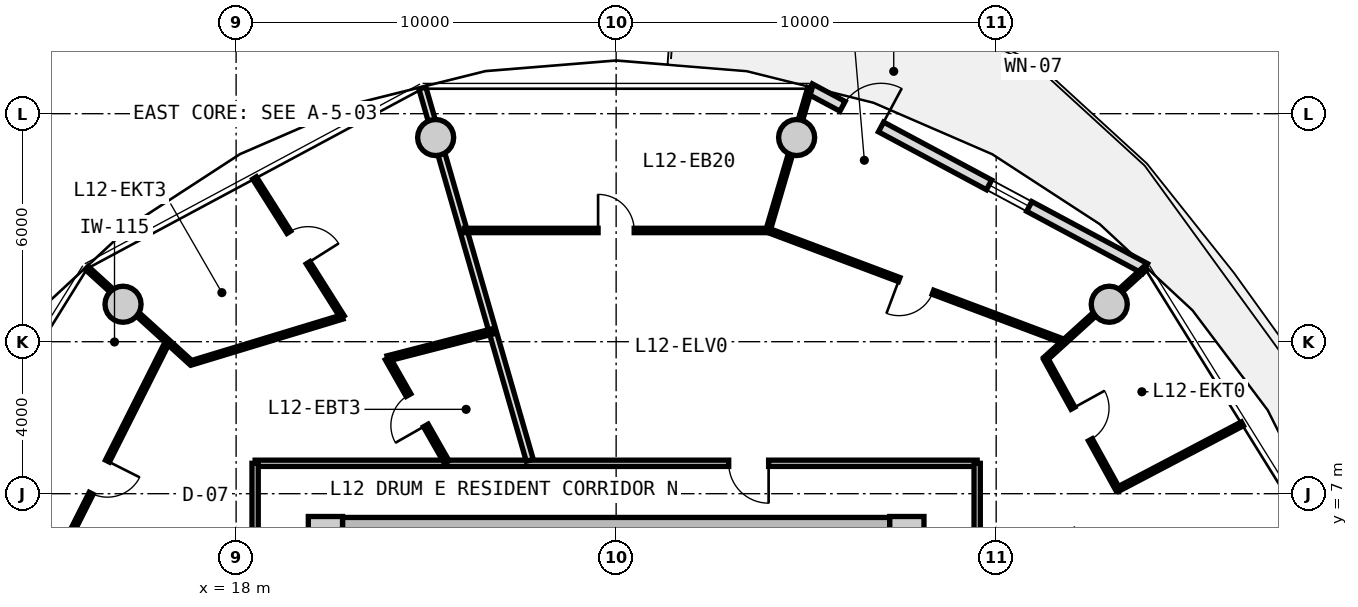
"""IFC4 building model, lengths in metres.
Left out: names, types, materials, properties, quantities, classifications, styles, units other than length and angle.
Written with IfcOpenShell. Run it as: python <this file> out.ifc"""

import sys

from ifc_helpers import new_model, si_unit, direction, frame, frame_2d, origin, origin_2d, place, context, subcontext, project, spatial, rectangle, circle, extrude, source, transform, mapped, element, fill, save


model = new_model("IFC4")
c1 = context("Model", 3, precision=1e-05, world=origin(), true_north=direction((0.0, 1.0)))
c2 = subcontext(c1, "Body", "Model", "MODEL_VIEW")
j1 = project(units=[si_unit("LENGTHUNIT", "METRE"), si_unit("PLANEANGLEUNIT", "RADIAN")], contexts=[c1])
p1 = place(None, origin())
s1 = spatial("IfcSite", under=j1, at=p1, CompositionType="ELEMENT")
p2 = place(p1, origin())
s2 = spatial("IfcBuilding", under=s1, at=p2, CompositionType="ELEMENT")
p3 = place(p2, frame((0.0, 0.0, 42.95)))
s3 = spatial("IfcBuildingStorey", under=s2, at=p3, CompositionType="ELEMENT", Elevation=42.95)
m1 = source(origin(), c2, "Body", "SweptSolid", [
    extrude(rectangle(XDim=0.9, YDim=0.9, at=origin_2d()), origin(), (0.0, 0.0, 1.0), 3.05),
])
for number, where, z_axis, x_axis in (
    (1, (35.65, 5.95, 0.0), (0.0, 0.0, 1.0), (1.0, 0.0, 0.0)),
    (2, (20.35, 5.95, 0.0), (0.0, 0.0, 1.0), (1.0, 0.0, 0.0)),
):
    element("IfcColumn", number, at=place(p3, frame(where, z_axis=z_axis, x_axis=x_axis)), inside=s3, PredefinedType="COLUMN", context=c2, shape_type="MappedRepresentation", body=[
        mapped(m1, transform((0.0, 0.0, 0.0), x_axis=(1.0, 0.0, 0.0), y_axis=(0.0, 1.0, 0.0), z_axis=(0.0, 0.0, 1.0), scale=1.0)),
    ])
m2 = source(origin(), c2, "Body", "SweptSolid", [
    extrude(rectangle(XDim=14.4, YDim=0.85, at=frame_2d((7.2, 0.0))), origin(), (0.0, 0.0, 1.0), 2.79),
])
p4 = place(p3, frame((20.8, 5.95, 0.0), z_axis=(0.0, 0.0, 1.0), x_axis=(1.0, 0.0, 0.0)))
e3 = element("IfcWall", 3, at=p4, inside=s3, PredefinedType="SHEAR", context=c2, shape_type="MappedRepresentation", body=[
    mapped(m2, transform((0.0, 0.0, 0.0), x_axis=(1.0, 0.0, 0.0), y_axis=(0.0, 1.0, 0.0), z_axis=(0.0, 0.0, 1.0), scale=1.0)),
])
m3 = source(origin(), c2, "Body", "SweptSolid", [
    extrude(circle(Radius=0.475, at=origin_2d()), origin(), (0.0, 0.0, 1.0), 3.05),
])
for number, where, z_axis, x_axis in (
    (4, (40.975, 11.985, 0.0), (0.0, 0.0, 1.0), (1.0, 0.0, 0.0)),
    (5, (32.749, 16.373, 0.0), (0.0, 0.0, 1.0), (1.0, 0.0, 0.0)),
    (6, (23.251, 16.373, 0.0), (0.0, 0.0, 1.0), (1.0, 0.0, 0.0)),
    (7, (15.025, 11.985, 0.0), (0.0, 0.0, 1.0), (1.0, 0.0, 0.0)),
):
    element("IfcColumn", number, at=place(p3, frame(where, z_axis=z_axis, x_axis=x_axis)), inside=s3, PredefinedType="COLUMN", context=c2, shape_type="MappedRepresentation", body=[
        mapped(m3, transform((0.0, 0.0, 0.0), x_axis=(1.0, 0.0, 0.0), y_axis=(0.0, 1.0, 0.0), z_axis=(0.0, 0.0, 1.0), scale=1.0)),
    ])
m4 = source(origin(), c2, "Body", "SweptSolid", [
    extrude(rectangle(XDim=10.011, YDim=0.29, at=frame_2d((5.005, 0.0))), origin(), (0.0, 0.0, 1.0), 2.79),
])
p5 = place(p3, frame((33.094, 17.657, 0.0), z_axis=(0.0, 0.0, 1.0), x_axis=(0.881272505317, -0.472608475773, 0.0)))
e8 = element("IfcWall", 8, at=p5, inside=s3, PredefinedType="SOLIDWALL", context=c2, shape_type="MappedRepresentation", body=[
    mapped(m4, transform((0.0, 0.0, 0.0), x_axis=(1.0, 0.0, 0.0), y_axis=(0.0, 1.0, 0.0), z_axis=(0.0, 0.0, 1.0), scale=1.0)),
])
p6 = place(p5, frame((0.98, 0.0, 0.0)))
e9 = element("IfcOpeningElement", 9, at=p6, cuts=e8, PredefinedType="OPENING", context=c2, shape_type="SweptSolid", body=[
    extrude(rectangle(XDim=1.15, YDim=2.25, at=frame_2d((0.575, 1.125))), frame((0.0, 0.155, 0.0), z_axis=(0.0, -1.0, 0.0), x_axis=(1.0, 0.0, 0.0)), (0.0, 0.0, 1.0), 0.31),
])
p7 = place(p5, frame((5.355, 0.0, 0.85)))
e10 = element("IfcOpeningElement", 10, at=p7, cuts=e8, PredefinedType="OPENING", context=c2, shape_type="SweptSolid", body=[
    extrude(rectangle(XDim=1.2, YDim=1.5, at=frame_2d((0.6, 0.75))), frame((0.0, 0.155, 0.0), z_axis=(0.0, -1.0, 0.0), x_axis=(1.0, 0.0, 0.0)), (0.0, 0.0, 1.0), 0.31),
])
m5 = source(origin(), c2, "Body", "SweptSolid", [
    extrude(rectangle(XDim=19.0, YDim=0.165, at=frame_2d((9.5, 0.0))), origin(), (0.0, 0.0, 1.0), 2.775),
])
p8 = place(p3, frame((18.5, 7.8, 0.0), z_axis=(0.0, 0.0, 1.0), x_axis=(1.0, 0.0, 0.0)))
e11 = element("IfcWall", 11, at=p8, inside=s3, PredefinedType="PARTITIONING", context=c2, shape_type="MappedRepresentation", body=[
    mapped(m5, transform((0.0, 0.0, 0.0), x_axis=(1.0, 0.0, 0.0), y_axis=(0.0, 1.0, 0.0), z_axis=(0.0, 0.0, 1.0), scale=1.0)),
])
p9 = place(p8, frame((12.462, 0.0, 0.0)))
e12 = element("IfcOpeningElement", 12, at=p9, cuts=e11, PredefinedType="OPENING", context=c2, shape_type="SweptSolid", body=[
    extrude(rectangle(XDim=1.05, YDim=2.15, at=frame_2d((0.525, 1.075))), frame((0.0, 0.093, 0.0), z_axis=(0.0, -1.0, 0.0), x_axis=(1.0, 0.0, 0.0)), (0.0, 0.0, 1.0), 0.185),
])
m6 = source(origin(), c2, "Body", "SweptSolid", [
    extrude(rectangle(XDim=15.6, YDim=0.165, at=frame_2d((7.8, 0.0))), origin(), (0.0, 0.0, 1.0), 2.775),
])
p10 = place(p3, frame((18.5, -7.8, 0.0), z_axis=(0.0, 0.0, 1.0), x_axis=(0.0, 1.0, 0.0)))
e13 = element("IfcWall", 13, at=p10, inside=s3, PredefinedType="PARTITIONING", context=c2, shape_type="MappedRepresentation", body=[
    mapped(m6, transform((0.0, 0.0, 0.0), x_axis=(1.0, 0.0, 0.0), y_axis=(0.0, 1.0, 0.0), z_axis=(0.0, 0.0, 1.0), scale=1.0)),
])
p11 = place(p10, frame((7.275, 0.0, 0.0)))
e14 = element("IfcOpeningElement", 14, at=p11, cuts=e13, PredefinedType="OPENING", context=c2, shape_type="SweptSolid", body=[
    extrude(rectangle(XDim=1.05, YDim=2.15, at=frame_2d((0.525, 1.075))), frame((0.0, 0.093, 0.0), z_axis=(0.0, -1.0, 0.0), x_axis=(1.0, 0.0, 0.0)), (0.0, 0.0, 1.0), 0.185),
])
p12 = place(p3, frame((37.5, 7.8, 0.0), z_axis=(0.0, 0.0, 1.0), x_axis=(0.0, -1.0, 0.0)))
e15 = element("IfcWall", 15, at=p12, inside=s3, PredefinedType="PARTITIONING", context=c2, shape_type="MappedRepresentation", body=[
    mapped(m6, transform((0.0, 0.0, 0.0), x_axis=(1.0, 0.0, 0.0), y_axis=(0.0, 1.0, 0.0), z_axis=(0.0, 0.0, 1.0), scale=1.0)),
])
p13 = place(p12, frame((14.215, 0.0, 0.0)))
e16 = element("IfcOpeningElement", 16, at=p13, cuts=e15, PredefinedType="OPENING", context=c2, shape_type="SweptSolid", body=[
    extrude(rectangle(XDim=0.92, YDim=2.1, at=frame_2d((0.46, 1.05))), frame((0.0, 0.093, 0.0), z_axis=(0.0, -1.0, 0.0), x_axis=(1.0, 0.0, 0.0)), (0.0, 0.0, 1.0), 0.185),
])
p14 = place(p12, frame((11.609, 0.0, 0.0)))
e17 = element("IfcOpeningElement", 17, at=p14, cuts=e15, PredefinedType="OPENING", context=c2, shape_type="SweptSolid", body=[
    extrude(rectangle(XDim=0.92, YDim=2.1, at=frame_2d((0.46, 1.05))), frame((0.0, 0.093, 0.0), z_axis=(0.0, -1.0, 0.0), x_axis=(1.0, 0.0, 0.0)), (0.0, 0.0, 1.0), 0.185),
])
p15 = place(p12, frame((7.175, 0.0, 0.0)))
e18 = element("IfcOpeningElement", 18, at=p15, cuts=e15, PredefinedType="OPENING", context=c2, shape_type="SweptSolid", body=[
    extrude(rectangle(XDim=1.25, YDim=2.2, at=frame_2d((0.625, 1.1))), frame((0.0, 0.093, 0.0), z_axis=(0.0, -1.0, 0.0), x_axis=(1.0, 0.0, 0.0)), (0.0, 0.0, 1.0), 0.185),
])
m7 = source(origin(), c2, "Body", "SweptSolid", [
    extrude(rectangle(XDim=10.196, YDim=0.19, at=frame_2d((5.098, 0.0))), origin(), (0.0, 0.0, 1.0), 2.225),
])
p16 = place(p3, frame((25.727, 7.88, 0.0), z_axis=(0.0, 0.0, 1.0), x_axis=(-0.277136420347, 0.960830580549, 0.0)))
e19 = element("IfcWall", 19, at=p16, inside=s3, PredefinedType="PARTITIONING", context=c2, shape_type="MappedRepresentation", body=[
    mapped(m7, transform((0.0, 0.0, 0.0), x_axis=(1.0, 0.0, 0.0), y_axis=(0.0, 1.0, 0.0), z_axis=(0.0, 0.0, 1.0), scale=1.0)),
])
m8 = source(origin(), c2, "Body", "SweptSolid", [
    extrude(rectangle(XDim=8.018, YDim=0.115, at=frame_2d((4.009, 0.0))), origin(), (0.0, 0.0, 1.0), 2.775),
])
p17 = place(p3, frame((16.205, 11.014, 0.0), z_axis=(0.0, 0.0, 1.0), x_axis=(-0.450134355233, -0.89296084026, 0.0)))
e20 = element("IfcWall", 20, at=p17, inside=s3, PredefinedType="PARTITIONING", context=c2, shape_type="MappedRepresentation", body=[
    mapped(m8, transform((0.0, 0.0, 0.0), x_axis=(1.0, 0.0, 0.0), y_axis=(0.0, 1.0, 0.0), z_axis=(0.0, 0.0, 1.0), scale=1.0)),
])
p18 = place(p17, frame((3.534, 0.0, 0.0)))
e21 = element("IfcOpeningElement", 21, at=p18, cuts=e20, PredefinedType="OPENING", context=c2, shape_type="SweptSolid", body=[
    extrude(rectangle(XDim=0.95, YDim=2.1, at=frame_2d((0.475, 1.05))), frame((0.0, 0.067, 0.0), z_axis=(0.0, -1.0, 0.0), x_axis=(1.0, 0.0, 0.0)), (0.0, 0.0, 1.0), 0.135),
])
m9 = source(origin(), c2, "Body", "SweptSolid", [
    extrude(rectangle(XDim=3.7, YDim=0.115, at=frame_2d((1.85, 0.0))), origin(), (0.0, 0.0, 1.0), 2.225),
])
p19 = place(p3, frame((16.808, 10.451, 0.0), z_axis=(0.0, 0.0, 1.0), x_axis=(-0.739922161065, 0.672692497033, 0.0)))
e22 = element("IfcWall", 22, at=p19, inside=s3, PredefinedType="PARTITIONING", context=c2, shape_type="MappedRepresentation", body=[
    mapped(m9, transform((0.0, 0.0, 0.0), x_axis=(1.0, 0.0, 0.0), y_axis=(0.0, 1.0, 0.0), z_axis=(0.0, 0.0, 1.0), scale=1.0)),
])
m10 = source(origin(), c2, "Body", "SweptSolid", [
    extrude(rectangle(XDim=3.141, YDim=0.14, at=frame_2d((1.571, 0.0))), origin(), (0.0, 0.0, 1.0), 2.775),
])
p20 = place(p3, frame((23.542, 7.83, 0.0), z_axis=(0.0, 0.0, 1.0), x_axis=(-0.494874486088, 0.868964465913, 0.0)))
e23 = element("IfcWall", 23, at=p20, inside=s3, PredefinedType="PARTITIONING", context=c2, shape_type="MappedRepresentation", body=[
    mapped(m10, transform((0.0, 0.0, 0.0), x_axis=(1.0, 0.0, 0.0), y_axis=(0.0, 1.0, 0.0), z_axis=(0.0, 0.0, 1.0), scale=1.0)),
])
p21 = place(p20, frame((1.111, 0.0, 0.0)))
e24 = element("IfcOpeningElement", 24, at=p21, cuts=e23, PredefinedType="OPENING", context=c2, shape_type="SweptSolid", body=[
    extrude(rectangle(XDim=0.92, YDim=2.1, at=frame_2d((0.46, 1.05))), frame((0.0, 0.08, 0.0), z_axis=(0.0, -1.0, 0.0), x_axis=(1.0, 0.0, 0.0)), (0.0, 0.0, 1.0), 0.16),
])
m11 = source(origin(), c2, "Body", "SweptSolid", [
    extrude(rectangle(XDim=2.868, YDim=0.14, at=frame_2d((1.434, 0.0))), origin(), (0.0, 0.0, 1.0), 2.775),
])
p22 = place(p3, frame((21.987, 10.56, 0.0), z_axis=(0.0, 0.0, 1.0), x_axis=(0.968467705195, 0.249139125778, 0.0)))
e25 = element("IfcWall", 25, at=p22, inside=s3, PredefinedType="PARTITIONING", context=c2, shape_type="MappedRepresentation", body=[
    mapped(m11, transform((0.0, 0.0, 0.0), x_axis=(1.0, 0.0, 0.0), y_axis=(0.0, 1.0, 0.0), z_axis=(0.0, 0.0, 1.0), scale=1.0)),
])
m12 = source(origin(), c2, "Body", "SweptSolid", [
    extrude(rectangle(XDim=4.326, YDim=0.115, at=frame_2d((2.163, 0.0))), origin(), (0.0, 0.0, 1.0), 2.775),
])
p23 = place(p3, frame((20.796, 11.651, 0.0), z_axis=(0.0, 0.0, 1.0), x_axis=(-0.534101263803, 0.845420510755, 0.0)))
e26 = element("IfcWall", 26, at=p23, inside=s3, PredefinedType="PARTITIONING", context=c2, shape_type="MappedRepresentation", body=[
    mapped(m12, transform((0.0, 0.0, 0.0), x_axis=(1.0, 0.0, 0.0), y_axis=(0.0, 1.0, 0.0), z_axis=(0.0, 0.0, 1.0), scale=1.0)),
])
p24 = place(p23, frame((1.688, 0.0, 0.0)))
e27 = element("IfcOpeningElement", 27, at=p24, cuts=e26, PredefinedType="OPENING", context=c2, shape_type="SweptSolid", body=[
    extrude(rectangle(XDim=0.95, YDim=2.1, at=frame_2d((0.475, 1.05))), frame((0.0, 0.067, 0.0), z_axis=(0.0, -1.0, 0.0), x_axis=(1.0, 0.0, 0.0)), (0.0, 0.0, 1.0), 0.135),
])
m13 = source(origin(), c2, "Body", "SweptSolid", [
    extrude(rectangle(XDim=4.159, YDim=0.115, at=frame_2d((2.079, 0.0))), origin(), (0.0, 0.0, 1.0), 2.415),
])
p25 = place(p3, frame((20.796, 11.651, 0.0), z_axis=(0.0, 0.0, 1.0), x_axis=(-0.956846477815, -0.290593905466, 0.0)))
e28 = element("IfcWall", 28, at=p25, inside=s3, PredefinedType="PARTITIONING", context=c2, shape_type="MappedRepresentation", body=[
    mapped(m13, transform((0.0, 0.0, 0.0), x_axis=(1.0, 0.0, 0.0), y_axis=(0.0, 1.0, 0.0), z_axis=(0.0, 0.0, 1.0), scale=1.0)),
])
m14 = source(origin(), c2, "Body", "SweptSolid", [
    extrude(rectangle(XDim=8.32, YDim=0.115, at=frame_2d((4.16, 0.0))), origin(), (0.0, 0.0, 1.0), 2.775),
])
p26 = place(p3, frame((39.786, 11.006, 0.0), z_axis=(0.0, 0.0, 1.0), x_axis=(-0.936180763098, 0.351518959382, 0.0)))
e29 = element("IfcWall", 29, at=p26, inside=s3, PredefinedType="PARTITIONING", context=c2, shape_type="MappedRepresentation", body=[
    mapped(m14, transform((0.0, 0.0, 0.0), x_axis=(1.0, 0.0, 0.0), y_axis=(0.0, 1.0, 0.0), z_axis=(0.0, 0.0, 1.0), scale=1.0)),
])
p27 = place(p26, frame((3.685, 0.0, 0.0)))
e30 = element("IfcOpeningElement", 30, at=p27, cuts=e29, PredefinedType="OPENING", context=c2, shape_type="SweptSolid", body=[
    extrude(rectangle(XDim=0.95, YDim=2.1, at=frame_2d((0.475, 1.05))), frame((0.0, 0.067, 0.0), z_axis=(0.0, -1.0, 0.0), x_axis=(1.0, 0.0, 0.0)), (0.0, 0.0, 1.0), 0.135),
])
m15 = source(origin(), c2, "Body", "SweptSolid", [
    extrude(rectangle(XDim=3.563, YDim=0.115, at=frame_2d((1.781, 0.0))), origin(), (0.0, 0.0, 1.0), 2.225),
])
p28 = place(p3, frame((39.292, 10.545, 0.0), z_axis=(0.0, 0.0, 1.0), x_axis=(0.740277955068, 0.672300936515, 0.0)))
e31 = element("IfcWall", 31, at=p28, inside=s3, PredefinedType="PARTITIONING", context=c2, shape_type="MappedRepresentation", body=[
    mapped(m15, transform((0.0, 0.0, 0.0), x_axis=(1.0, 0.0, 0.0), y_axis=(0.0, 1.0, 0.0), z_axis=(0.0, 0.0, 1.0), scale=1.0)),
])
m16 = source(origin(), c2, "Body", "SweptSolid", [
    extrude(rectangle(XDim=7.993, YDim=0.115, at=frame_2d((3.996, 0.0))), origin(), (0.0, 0.0, 1.0), 2.775),
])
p29 = place(p3, frame((31.996, 13.927, 0.0), z_axis=(0.0, 0.0, 1.0), x_axis=(-1.0, 0.0, 0.0)))
e32 = element("IfcWall", 32, at=p29, inside=s3, PredefinedType="PARTITIONING", context=c2, shape_type="MappedRepresentation", body=[
    mapped(m16, transform((0.0, 0.0, 0.0), x_axis=(1.0, 0.0, 0.0), y_axis=(0.0, 1.0, 0.0), z_axis=(0.0, 0.0, 1.0), scale=1.0)),
])
p30 = place(p29, frame((3.521, 0.0, 0.0)))
e33 = element("IfcOpeningElement", 33, at=p30, cuts=e32, PredefinedType="OPENING", context=c2, shape_type="SweptSolid", body=[
    extrude(rectangle(XDim=0.95, YDim=2.1, at=frame_2d((0.475, 1.05))), frame((0.0, 0.067, 0.0), z_axis=(0.0, -1.0, 0.0), x_axis=(1.0, 0.0, 0.0)), (0.0, 0.0, 1.0), 0.135),
])
m17 = source(origin(), c2, "Body", "SweptSolid", [
    extrude(rectangle(XDim=3.908, YDim=0.115, at=frame_2d((1.954, 0.0))), origin(), (0.0, 0.0, 1.0), 2.225),
])
p31 = place(p3, frame((31.996, 13.927, 0.0), z_axis=(0.0, 0.0, 1.0), x_axis=(0.282047948883, 0.959400309845, 0.0)))
e34 = element("IfcWall", 34, at=p31, inside=s3, PredefinedType="PARTITIONING", context=c2, shape_type="MappedRepresentation", body=[
    mapped(m17, transform((0.0, 0.0, 0.0), x_axis=(1.0, 0.0, 0.0), y_axis=(0.0, 1.0, 0.0), z_axis=(0.0, 0.0, 1.0), scale=1.0)),
])
m18 = source(origin(), c2, "Body", "SweptSolid", [
    extrude(rectangle(XDim=3.706, YDim=0.115, at=frame_2d((1.853, 0.0))), origin(), (0.0, 0.0, 1.0), 2.775),
])
p32 = place(p3, frame((41.198, 7.115, 0.0), z_axis=(0.0, 0.0, 1.0), x_axis=(0.88538502503, 0.464858427322, 0.0)))
e35 = element("IfcWall", 35, at=p32, inside=s3, PredefinedType="PARTITIONING", context=c2, shape_type="MappedRepresentation", body=[
    mapped(m18, transform((0.0, 0.0, 0.0), x_axis=(1.0, 0.0, 0.0), y_axis=(0.0, 1.0, 0.0), z_axis=(0.0, 0.0, 1.0), scale=1.0)),
])
m19 = source(origin(), c2, "Body", "SweptSolid", [
    extrude(rectangle(XDim=3.926, YDim=0.115, at=frame_2d((1.963, 0.0))), origin(), (0.0, 0.0, 1.0), 2.775),
])
p33 = place(p3, frame((41.198, 7.115, 0.0), z_axis=(0.0, 0.0, 1.0), x_axis=(-0.483037889915, 0.875599450038, 0.0)))
e36 = element("IfcWall", 36, at=p33, inside=s3, PredefinedType="PARTITIONING", context=c2, shape_type="MappedRepresentation", body=[
    mapped(m19, transform((0.0, 0.0, 0.0), x_axis=(1.0, 0.0, 0.0), y_axis=(0.0, 1.0, 0.0), z_axis=(0.0, 0.0, 1.0), scale=1.0)),
])
p34 = place(p33, frame((1.488, 0.0, 0.0)))
e37 = element("IfcOpeningElement", 37, at=p34, cuts=e36, PredefinedType="OPENING", context=c2, shape_type="SweptSolid", body=[
    extrude(rectangle(XDim=0.95, YDim=2.1, at=frame_2d((0.475, 1.05))), frame((0.0, 0.067, 0.0), z_axis=(0.0, -1.0, 0.0), x_axis=(1.0, 0.0, 0.0)), (0.0, 0.0, 1.0), 0.135),
])
m20 = source(origin(), c2, "Body", "SweptSolid", [
    extrude(rectangle(XDim=1.15, YDim=2.25, at=frame_2d((0.575, 1.125))), frame((0.0, 0.025, 0.0), z_axis=(0.0, -1.0, 0.0), x_axis=(1.0, 0.0, 0.0)), (0.0, 0.0, 1.0), 0.05),
])
p35 = place(p6, origin())
e38 = element("IfcDoor", 38, at=p35, inside=s3, OperationType="SINGLE_SWING_RIGHT", PredefinedType="DOOR", context=c2, shape_type="MappedRepresentation", body=[
    mapped(m20, transform((0.0, 0.0, 0.0), x_axis=(1.0, 0.0, 0.0), y_axis=(0.0, 1.0, 0.0), z_axis=(0.0, 0.0, 1.0), scale=1.0)),
])
fill(e9, e38)
m21 = source(origin(), c2, "Body", "SweptSolid", [
    extrude(rectangle(XDim=1.2, YDim=1.5, at=frame_2d((0.6, 0.75))), frame((0.0, 0.03, 0.0), z_axis=(0.0, -1.0, 0.0), x_axis=(1.0, 0.0, 0.0)), (0.0, 0.0, 1.0), 0.06),
])
p36 = place(p7, origin())
e39 = element("IfcWindow", 39, at=p36, inside=s3, PartitioningType="SINGLE_PANEL", PredefinedType="WINDOW", context=c2, shape_type="MappedRepresentation", body=[
    mapped(m21, transform((0.0, 0.0, 0.0), x_axis=(1.0, 0.0, 0.0), y_axis=(0.0, 1.0, 0.0), z_axis=(0.0, 0.0, 1.0), scale=1.0)),
])
fill(e10, e39)
m22 = source(origin(), c2, "Body", "SweptSolid", [
    extrude(rectangle(XDim=0.92, YDim=2.1, at=frame_2d((0.46, 1.05))), frame((0.0, 0.025, 0.0), z_axis=(0.0, -1.0, 0.0), x_axis=(1.0, 0.0, 0.0)), (0.0, 0.0, 1.0), 0.05),
])
p37 = place(p21, origin())
e40 = element("IfcDoor", 40, at=p37, inside=s3, OperationType="SINGLE_SWING_LEFT", PredefinedType="DOOR", context=c2, shape_type="MappedRepresentation", body=[
    mapped(m22, transform((0.0, 0.0, 0.0), x_axis=(1.0, 0.0, 0.0), y_axis=(0.0, 1.0, 0.0), z_axis=(0.0, 0.0, 1.0), scale=1.0)),
])
fill(e24, e40)
m23 = source(origin(), c2, "Body", "SweptSolid", [
    extrude(rectangle(XDim=0.95, YDim=2.1, at=frame_2d((0.475, 1.05))), frame((0.0, 0.025, 0.0), z_axis=(0.0, -1.0, 0.0), x_axis=(1.0, 0.0, 0.0)), (0.0, 0.0, 1.0), 0.05),
])
p38 = place(p24, frame((0.95, 0.0, 0.0), z_axis=(0.0, 0.0, 1.0), x_axis=(-1.0, 0.0, 0.0)))
e41 = element("IfcDoor", 41, at=p38, inside=s3, OperationType="SINGLE_SWING_RIGHT", PredefinedType="DOOR", context=c2, shape_type="MappedRepresentation", body=[
    mapped(m23, transform((0.0, 0.0, 0.0), x_axis=(1.0, 0.0, 0.0), y_axis=(0.0, 1.0, 0.0), z_axis=(0.0, 0.0, 1.0), scale=1.0)),
])
fill(e27, e41)
p39 = place(p18, origin())
e42 = element("IfcDoor", 42, at=p39, inside=s3, OperationType="SINGLE_SWING_LEFT", PredefinedType="DOOR", context=c2, shape_type="MappedRepresentation", body=[
    mapped(m23, transform((0.0, 0.0, 0.0), x_axis=(1.0, 0.0, 0.0), y_axis=(0.0, 1.0, 0.0), z_axis=(0.0, 0.0, 1.0), scale=1.0)),
])
fill(e21, e42)
m24 = source(origin(), c2, "Body", "SweptSolid", [
    extrude(rectangle(XDim=1.05, YDim=2.15, at=frame_2d((0.525, 1.075))), frame((0.0, 0.025, 0.0), z_axis=(0.0, -1.0, 0.0), x_axis=(1.0, 0.0, 0.0)), (0.0, 0.0, 1.0), 0.05),
])
p40 = place(p9, frame((1.05, 0.0, 0.0), z_axis=(0.0, 0.0, 1.0), x_axis=(-1.0, 0.0, 0.0)))
e43 = element("IfcDoor", 43, at=p40, inside=s3, OperationType="SINGLE_SWING_LEFT", PredefinedType="DOOR", context=c2, shape_type="MappedRepresentation", body=[
    mapped(m24, transform((0.0, 0.0, 0.0), x_axis=(1.0, 0.0, 0.0), y_axis=(0.0, 1.0, 0.0), z_axis=(0.0, 0.0, 1.0), scale=1.0)),
])
fill(e12, e43)
p41 = place(p34, frame((0.95, 0.0, 0.0), z_axis=(0.0, 0.0, 1.0), x_axis=(-1.0, 0.0, 0.0)))
e44 = element("IfcDoor", 44, at=p41, inside=s3, OperationType="SINGLE_SWING_LEFT", PredefinedType="DOOR", context=c2, shape_type="MappedRepresentation", body=[
    mapped(m23, transform((0.0, 0.0, 0.0), x_axis=(1.0, 0.0, 0.0), y_axis=(0.0, 1.0, 0.0), z_axis=(0.0, 0.0, 1.0), scale=1.0)),
])
fill(e37, e44)
p42 = place(p27, origin())
e45 = element("IfcDoor", 45, at=p42, inside=s3, OperationType="SINGLE_SWING_RIGHT", PredefinedType="DOOR", context=c2, shape_type="MappedRepresentation", body=[
    mapped(m23, transform((0.0, 0.0, 0.0), x_axis=(1.0, 0.0, 0.0), y_axis=(0.0, 1.0, 0.0), z_axis=(0.0, 0.0, 1.0), scale=1.0)),
])
fill(e30, e45)
p43 = place(p30, frame((0.95, 0.0, 0.0), z_axis=(0.0, 0.0, 1.0), x_axis=(-1.0, 0.0, 0.0)))
e46 = element("IfcDoor", 46, at=p43, inside=s3, OperationType="SINGLE_SWING_LEFT", PredefinedType="DOOR", context=c2, shape_type="MappedRepresentation", body=[
    mapped(m23, transform((0.0, 0.0, 0.0), x_axis=(1.0, 0.0, 0.0), y_axis=(0.0, 1.0, 0.0), z_axis=(0.0, 0.0, 1.0), scale=1.0)),
])
fill(e33, e46)
save(model, sys.argv[1])
